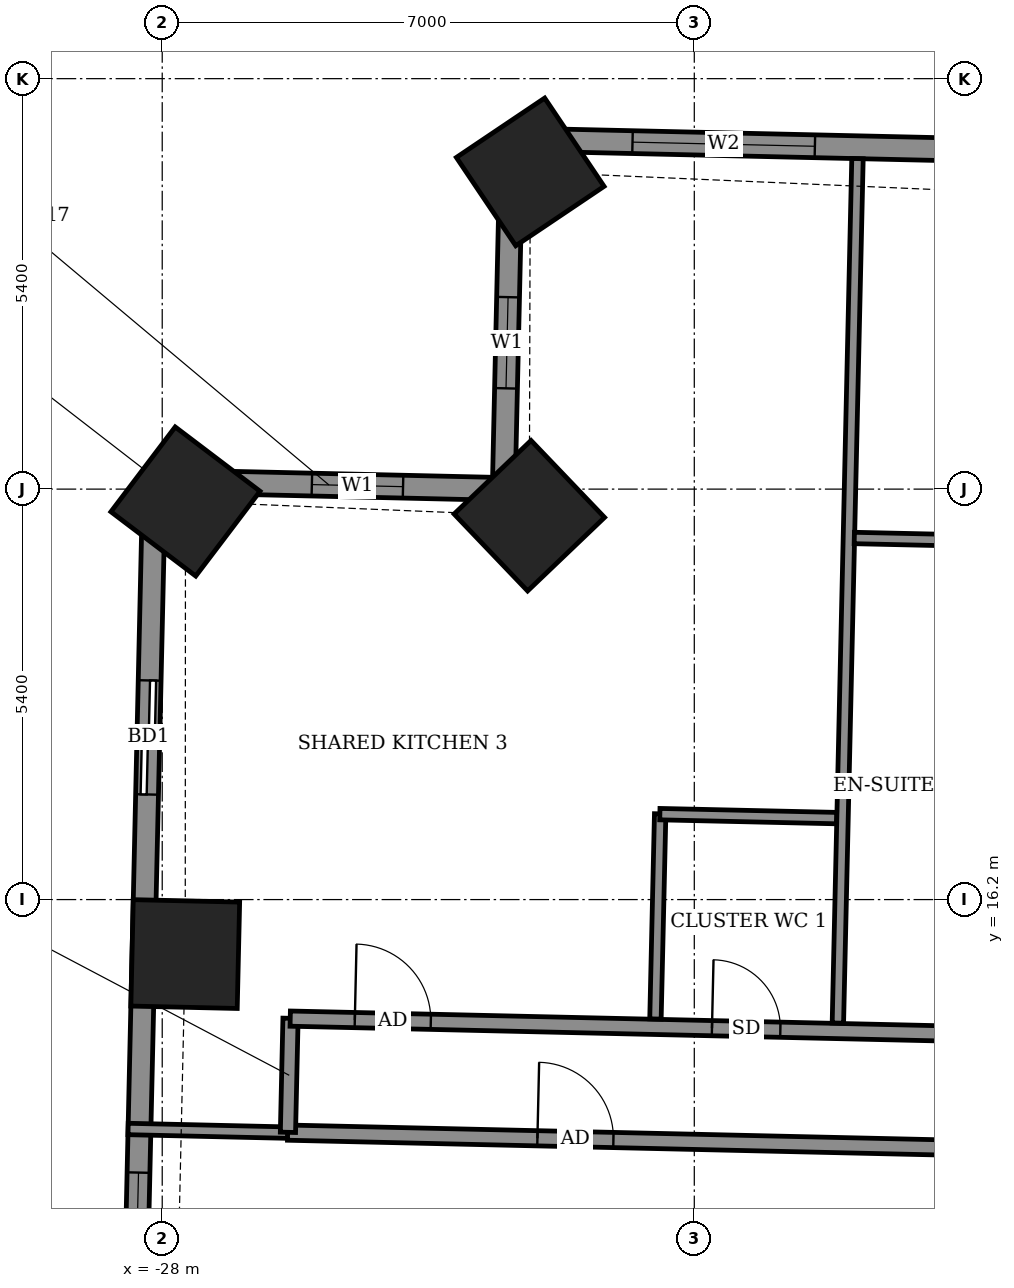
"""IFC4 building model, lengths in metres.
Left out: names, types, materials, properties, quantities, classifications, styles, units other than length and angle.
Written with IfcOpenShell. Run it as: python <this file> out.ifc"""

import sys

from ifc_helpers import new_model, si_unit, direction, frame, frame_2d, origin, origin_2d, place, context, subcontext, project, spatial, rectangle, extrude, element, fill, save


model = new_model("IFC4")
c1 = context("Model", 3, precision=1e-05, world=origin(), true_north=direction((0.0, 1.0)))
c2 = subcontext(c1, "Body", "Model", "MODEL_VIEW")
j1 = project(units=[si_unit("LENGTHUNIT", "METRE"), si_unit("PLANEANGLEUNIT", "RADIAN")], contexts=[c1])
p1 = place(None, origin())
s1 = spatial("IfcSite", under=j1, at=p1, CompositionType="ELEMENT")
p2 = place(p1, origin())
s2 = spatial("IfcBuilding", under=s1, at=p2, CompositionType="ELEMENT")
p3 = place(p2, frame((0.0, 0.0, 109.1)))
s3 = spatial("IfcBuildingStorey", under=s2, at=p3, CompositionType="ELEMENT", Elevation=109.1)
for number, where, z_axis, x_axis in (
    (1, (-23.158, 25.773, -0.55), (0.0, 0.0, 1.0), (-0.83, -0.558, 0.0)),
    (2, (-23.17, 21.25, -0.55), (0.0, 0.0, 1.0), (-0.723, -0.691, 0.0)),
    (3, (-27.694, 21.437, -0.55), (0.0, 0.0, 1.0), (-0.604, -0.797, 0.0)),
    (4, (-27.697, 15.483, -0.55), (0.0, 0.0, 1.0), (-0.023, -1.0, 0.0)),
):
    element("IfcColumn", number, at=place(p3, frame(where, z_axis=z_axis, x_axis=x_axis)), inside=s3, PredefinedType="COLUMN", context=c2, shape_type="SweptSolid", body=[
        extrude(rectangle(XDim=1.4, YDim=1.4, at=origin_2d()), origin(), (0.0, 0.0, 1.0), 3.6),
    ])
p4 = place(p3, frame((21.894, 25.173, 0.0), z_axis=(0.0, 0.0, 1.0), x_axis=(-0.999742661083, 0.022685052594, 0.0)))
e5 = element("IfcWall", 5, at=p4, inside=s3, PredefinedType="SOLIDWALL", context=c2, shape_type="SweptSolid", body=[
    extrude(rectangle(XDim=45.309, YDim=0.3, at=frame_2d((22.654, 0.0))), origin(), (0.0, 0.0, 1.0), 3.05),
])
p5 = place(p4, frame((2.319, 0.0, 0.0)))
e6 = element("IfcOpeningElement", 6, at=p5, cuts=e5, PredefinedType="OPENING", context=c2, shape_type="SweptSolid", body=[
    extrude(rectangle(XDim=1.5, YDim=2.4, at=frame_2d((0.75, 1.2))), frame((0.0, 0.16, 0.0), z_axis=(0.0, -1.0, 0.0), x_axis=(1.0, 0.0, 0.0)), (0.0, 0.0, 1.0), 0.32),
])
p6 = place(p4, frame((7.437, 0.0, 0.0)))
e7 = element("IfcOpeningElement", 7, at=p6, cuts=e5, PredefinedType="OPENING", context=c2, shape_type="SweptSolid", body=[
    extrude(rectangle(XDim=1.5, YDim=2.4, at=frame_2d((0.75, 1.2))), frame((0.0, 0.16, 0.0), z_axis=(0.0, -1.0, 0.0), x_axis=(1.0, 0.0, 0.0)), (0.0, 0.0, 1.0), 0.32),
])
p7 = place(p4, frame((10.244, 0.0, 0.0)))
e8 = element("IfcOpeningElement", 8, at=p7, cuts=e5, PredefinedType="OPENING", context=c2, shape_type="SweptSolid", body=[
    extrude(rectangle(XDim=1.5, YDim=2.4, at=frame_2d((0.75, 1.2))), frame((0.0, 0.16, 0.0), z_axis=(0.0, -1.0, 0.0), x_axis=(1.0, 0.0, 0.0)), (0.0, 0.0, 1.0), 0.32),
])
p8 = place(p4, frame((15.583, 0.0, 0.0)))
e9 = element("IfcOpeningElement", 9, at=p8, cuts=e5, PredefinedType="OPENING", context=c2, shape_type="SweptSolid", body=[
    extrude(rectangle(XDim=1.5, YDim=2.4, at=frame_2d((0.75, 1.2))), frame((0.0, 0.16, 0.0), z_axis=(0.0, -1.0, 0.0), x_axis=(1.0, 0.0, 0.0)), (0.0, 0.0, 1.0), 0.32),
])
p9 = place(p4, frame((20.677, 0.0, 0.0)))
e10 = element("IfcOpeningElement", 10, at=p9, cuts=e5, PredefinedType="OPENING", context=c2, shape_type="SweptSolid", body=[
    extrude(rectangle(XDim=1.5, YDim=2.4, at=frame_2d((0.75, 1.2))), frame((0.0, 0.16, 0.0), z_axis=(0.0, -1.0, 0.0), x_axis=(1.0, 0.0, 0.0)), (0.0, 0.0, 1.0), 0.32),
])
p10 = place(p4, frame((23.485, 0.0, 0.0)))
e11 = element("IfcOpeningElement", 11, at=p10, cuts=e5, PredefinedType="OPENING", context=c2, shape_type="SweptSolid", body=[
    extrude(rectangle(XDim=1.5, YDim=2.4, at=frame_2d((0.75, 1.2))), frame((0.0, 0.16, 0.0), z_axis=(0.0, -1.0, 0.0), x_axis=(1.0, 0.0, 0.0)), (0.0, 0.0, 1.0), 0.32),
])
p11 = place(p4, frame((28.708, 0.0, 0.0)))
e12 = element("IfcOpeningElement", 12, at=p11, cuts=e5, PredefinedType="OPENING", context=c2, shape_type="SweptSolid", body=[
    extrude(rectangle(XDim=1.5, YDim=2.4, at=frame_2d((0.75, 1.2))), frame((0.0, 0.16, 0.0), z_axis=(0.0, -1.0, 0.0), x_axis=(1.0, 0.0, 0.0)), (0.0, 0.0, 1.0), 0.32),
])
p12 = place(p4, frame((33.793, 0.0, 0.0)))
e13 = element("IfcOpeningElement", 13, at=p12, cuts=e5, PredefinedType="OPENING", context=c2, shape_type="SweptSolid", body=[
    extrude(rectangle(XDim=1.5, YDim=2.4, at=frame_2d((0.75, 1.2))), frame((0.0, 0.16, 0.0), z_axis=(0.0, -1.0, 0.0), x_axis=(1.0, 0.0, 0.0)), (0.0, 0.0, 1.0), 0.32),
])
p13 = place(p4, frame((36.6, 0.0, 0.0)))
e14 = element("IfcOpeningElement", 14, at=p13, cuts=e5, PredefinedType="OPENING", context=c2, shape_type="SweptSolid", body=[
    extrude(rectangle(XDim=1.5, YDim=2.4, at=frame_2d((0.75, 1.2))), frame((0.0, 0.16, 0.0), z_axis=(0.0, -1.0, 0.0), x_axis=(1.0, 0.0, 0.0)), (0.0, 0.0, 1.0), 0.32),
])
p14 = place(p4, frame((41.318, 0.0, 0.9)))
e15 = element("IfcOpeningElement", 15, at=p14, cuts=e5, PredefinedType="OPENING", context=c2, shape_type="SweptSolid", body=[
    extrude(rectangle(XDim=2.4, YDim=1.5, at=frame_2d((1.2, 0.75))), frame((0.0, 0.16, 0.0), z_axis=(0.0, -1.0, 0.0), x_axis=(1.0, 0.0, 0.0)), (0.0, 0.0, 1.0), 0.32),
])
p15 = place(p3, frame((-23.403, 26.201, 0.0), z_axis=(0.0, 0.0, 1.0), x_axis=(-0.022609285172, -0.999744377441, 0.0)))
e16 = element("IfcWall", 16, at=p15, inside=s3, PredefinedType="SOLIDWALL", context=c2, shape_type="SweptSolid", body=[
    extrude(rectangle(XDim=4.6, YDim=0.3, at=frame_2d((2.3, 0.0))), origin(), (0.0, 0.0, 1.0), 2.55),
])
p16 = place(p15, frame((2.076, 0.0, 0.9)))
e17 = element("IfcOpeningElement", 17, at=p16, cuts=e16, PredefinedType="OPENING", context=c2, shape_type="SweptSolid", body=[
    extrude(rectangle(XDim=1.2, YDim=1.5, at=frame_2d((0.6, 0.75))), frame((0.0, 0.16, 0.0), z_axis=(0.0, -1.0, 0.0), x_axis=(1.0, 0.0, 0.0)), (0.0, 0.0, 1.0), 0.32),
])
p17 = place(p3, frame((-23.507, 21.602, 0.0), z_axis=(0.0, 0.0, 1.0), x_axis=(-0.999739556364, 0.022821468877, 0.0)))
e18 = element("IfcWall", 18, at=p17, inside=s3, PredefinedType="SOLIDWALL", context=c2, shape_type="SweptSolid", body=[
    extrude(rectangle(XDim=4.6, YDim=0.3, at=frame_2d((2.3, 0.0))), origin(), (0.0, 0.0, 1.0), 2.55),
])
p18 = place(p17, frame((1.325, 0.0, 0.9)))
e19 = element("IfcOpeningElement", 19, at=p18, cuts=e18, PredefinedType="OPENING", context=c2, shape_type="SweptSolid", body=[
    extrude(rectangle(XDim=1.2, YDim=1.5, at=frame_2d((0.6, 0.75))), frame((0.0, 0.16, 0.0), z_axis=(0.0, -1.0, 0.0), x_axis=(1.0, 0.0, 0.0)), (0.0, 0.0, 1.0), 0.32),
])
p19 = place(p3, frame((-28.106, 21.707, 0.0), z_axis=(0.0, 0.0, 1.0), x_axis=(-0.022654663697, -0.999743350172, 0.0)))
e20 = element("IfcWall", 20, at=p19, inside=s3, PredefinedType="SOLIDWALL", context=c2, shape_type="SweptSolid", body=[
    extrude(rectangle(XDim=12.63, YDim=0.3, at=frame_2d((6.315, 0.0))), origin(), (0.0, 0.0, 1.0), 3.05),
])
p20 = place(p19, frame((2.625, 0.0, 0.0)))
e21 = element("IfcOpeningElement", 21, at=p20, cuts=e20, PredefinedType="OPENING", context=c2, shape_type="SweptSolid", body=[
    extrude(rectangle(XDim=1.5, YDim=2.4, at=frame_2d((0.75, 1.2))), frame((0.0, 0.16, 0.0), z_axis=(0.0, -1.0, 0.0), x_axis=(1.0, 0.0, 0.0)), (0.0, 0.0, 1.0), 0.32),
])
p21 = place(p19, frame((9.101, 0.0, 0.9)))
e22 = element("IfcOpeningElement", 22, at=p21, cuts=e20, PredefinedType="OPENING", context=c2, shape_type="SweptSolid", body=[
    extrude(rectangle(XDim=2.4, YDim=1.5, at=frame_2d((1.2, 0.75))), frame((0.0, 0.16, 0.0), z_axis=(0.0, -1.0, 0.0), x_axis=(1.0, 0.0, 0.0)), (0.0, 0.0, 1.0), 0.32),
])
p22 = place(p3, frame((-28.449, 13.182, 0.0), z_axis=(0.0, 0.0, 1.0), x_axis=(0.999741236023, -0.022747769011, 0.0)))
e23 = element("IfcWall", 23, at=p22, inside=s3, PredefinedType="PARTITIONING", context=c2, shape_type="SweptSolid", body=[
    extrude(rectangle(XDim=2.104, YDim=0.15, at=frame_2d((1.052, 0.0))), origin(), (0.0, 0.0, 1.0), 2.55),
])
p23 = place(p3, frame((-26.35, 13.134, 0.0), z_axis=(0.0, 0.0, 1.0), x_axis=(0.999743721339, -0.022638278294, 0.0)))
e24 = element("IfcWall", 24, at=p23, inside=s3, PredefinedType="PARTITIONING", context=c2, shape_type="SweptSolid", body=[
    extrude(rectangle(XDim=9.674, YDim=0.2, at=frame_2d((4.837, 0.0))), origin(), (0.0, 0.0, 1.0), 3.05),
])
p24 = place(p23, frame((3.287, 0.0, 0.0)))
e25 = element("IfcOpeningElement", 25, at=p24, cuts=e24, PredefinedType="OPENING", context=c2, shape_type="SweptSolid", body=[
    extrude(rectangle(XDim=1.0, YDim=2.1, at=frame_2d((0.5, 1.05))), frame((0.0, 0.11, 0.0), z_axis=(0.0, -1.0, 0.0), x_axis=(1.0, 0.0, 0.0)), (0.0, 0.0, 1.0), 0.22),
])
p25 = place(p3, frame((-26.346, 13.138, 0.0), z_axis=(0.0, 0.0, 1.0), x_axis=(0.022617910375, 0.999744182344, 0.0)))
e26 = element("IfcWall", 26, at=p25, inside=s3, PredefinedType="PARTITIONING", context=c2, shape_type="SweptSolid", body=[
    extrude(rectangle(XDim=1.5, YDim=0.2, at=frame_2d((0.75, 0.0))), origin(), (0.0, 0.0, 1.0), 3.05),
])
p26 = place(p3, frame((-26.316, 14.634, 0.0), z_axis=(0.0, 0.0, 1.0), x_axis=(0.999742734556, -0.02268181435, 0.0)))
e27 = element("IfcWall", 27, at=p26, inside=s3, PredefinedType="PARTITIONING", context=c2, shape_type="SweptSolid", body=[
    extrude(rectangle(XDim=50.708, YDim=0.2, at=frame_2d((25.354, 0.0))), origin(), (0.0, 0.0, 1.0), 3.05),
])
p27 = place(p26, frame((48.229, 0.0, 0.0)))
e28 = element("IfcOpeningElement", 28, at=p27, cuts=e27, PredefinedType="OPENING", context=c2, shape_type="SweptSolid", body=[
    extrude(rectangle(XDim=1.0, YDim=2.1, at=frame_2d((0.5, 1.05))), frame((0.0, 0.11, 0.0), z_axis=(0.0, -1.0, 0.0), x_axis=(1.0, 0.0, 0.0)), (0.0, 0.0, 1.0), 0.22),
])
p28 = place(p26, frame((43.6, 0.0, 0.0)))
e29 = element("IfcOpeningElement", 29, at=p28, cuts=e27, PredefinedType="OPENING", context=c2, shape_type="SweptSolid", body=[
    extrude(rectangle(XDim=0.9, YDim=2.1, at=frame_2d((0.45, 1.05))), frame((0.0, 0.11, 0.0), z_axis=(0.0, -1.0, 0.0), x_axis=(1.0, 0.0, 0.0)), (0.0, 0.0, 1.0), 0.22),
])
p29 = place(p26, frame((38.925, 0.0, 0.0)))
e30 = element("IfcOpeningElement", 30, at=p29, cuts=e27, PredefinedType="OPENING", context=c2, shape_type="SweptSolid", body=[
    extrude(rectangle(XDim=0.9, YDim=2.1, at=frame_2d((0.45, 1.05))), frame((0.0, 0.11, 0.0), z_axis=(0.0, -1.0, 0.0), x_axis=(1.0, 0.0, 0.0)), (0.0, 0.0, 1.0), 0.22),
])
p30 = place(p26, frame((36.9, 0.0, 0.0)))
e31 = element("IfcOpeningElement", 31, at=p30, cuts=e27, PredefinedType="OPENING", context=c2, shape_type="SweptSolid", body=[
    extrude(rectangle(XDim=0.9, YDim=2.1, at=frame_2d((0.45, 1.05))), frame((0.0, 0.11, 0.0), z_axis=(0.0, -1.0, 0.0), x_axis=(1.0, 0.0, 0.0)), (0.0, 0.0, 1.0), 0.22),
])
p31 = place(p26, frame((29.975, 0.0, 0.0)))
e32 = element("IfcOpeningElement", 32, at=p31, cuts=e27, PredefinedType="OPENING", context=c2, shape_type="SweptSolid", body=[
    extrude(rectangle(XDim=0.9, YDim=2.1, at=frame_2d((0.45, 1.05))), frame((0.0, 0.11, 0.0), z_axis=(0.0, -1.0, 0.0), x_axis=(1.0, 0.0, 0.0)), (0.0, 0.0, 1.0), 0.22),
])
p32 = place(p26, frame((27.9, 0.0, 0.0)))
e33 = element("IfcOpeningElement", 33, at=p32, cuts=e27, PredefinedType="OPENING", context=c2, shape_type="SweptSolid", body=[
    extrude(rectangle(XDim=0.9, YDim=2.1, at=frame_2d((0.45, 1.05))), frame((0.0, 0.11, 0.0), z_axis=(0.0, -1.0, 0.0), x_axis=(1.0, 0.0, 0.0)), (0.0, 0.0, 1.0), 0.22),
])
p33 = place(p26, frame((21.175, 0.0, 0.0)))
e34 = element("IfcOpeningElement", 34, at=p33, cuts=e27, PredefinedType="OPENING", context=c2, shape_type="SweptSolid", body=[
    extrude(rectangle(XDim=0.9, YDim=2.1, at=frame_2d((0.45, 1.05))), frame((0.0, 0.11, 0.0), z_axis=(0.0, -1.0, 0.0), x_axis=(1.0, 0.0, 0.0)), (0.0, 0.0, 1.0), 0.22),
])
p34 = place(p26, frame((19.25, 0.0, 0.0)))
e35 = element("IfcOpeningElement", 35, at=p34, cuts=e27, PredefinedType="OPENING", context=c2, shape_type="SweptSolid", body=[
    extrude(rectangle(XDim=0.9, YDim=2.1, at=frame_2d((0.45, 1.05))), frame((0.0, 0.11, 0.0), z_axis=(0.0, -1.0, 0.0), x_axis=(1.0, 0.0, 0.0)), (0.0, 0.0, 1.0), 0.22),
])
p35 = place(p26, frame((12.375, 0.0, 0.0)))
e36 = element("IfcOpeningElement", 36, at=p35, cuts=e27, PredefinedType="OPENING", context=c2, shape_type="SweptSolid", body=[
    extrude(rectangle(XDim=0.9, YDim=2.1, at=frame_2d((0.45, 1.05))), frame((0.0, 0.11, 0.0), z_axis=(0.0, -1.0, 0.0), x_axis=(1.0, 0.0, 0.0)), (0.0, 0.0, 1.0), 0.22),
])
p36 = place(p26, frame((10.225, 0.0, 0.0)))
e37 = element("IfcOpeningElement", 37, at=p36, cuts=e27, PredefinedType="OPENING", context=c2, shape_type="SweptSolid", body=[
    extrude(rectangle(XDim=0.9, YDim=2.1, at=frame_2d((0.45, 1.05))), frame((0.0, 0.11, 0.0), z_axis=(0.0, -1.0, 0.0), x_axis=(1.0, 0.0, 0.0)), (0.0, 0.0, 1.0), 0.22),
])
p37 = place(p26, frame((0.85, 0.0, 0.0)))
e38 = element("IfcOpeningElement", 38, at=p37, cuts=e27, PredefinedType="OPENING", context=c2, shape_type="SweptSolid", body=[
    extrude(rectangle(XDim=1.0, YDim=2.1, at=frame_2d((0.5, 1.05))), frame((0.0, 0.11, 0.0), z_axis=(0.0, -1.0, 0.0), x_axis=(1.0, 0.0, 0.0)), (0.0, 0.0, 1.0), 0.22),
])
p38 = place(p26, frame((5.55, 0.0, 0.0)))
e39 = element("IfcOpeningElement", 39, at=p38, cuts=e27, PredefinedType="OPENING", context=c2, shape_type="SweptSolid", body=[
    extrude(rectangle(XDim=0.9, YDim=2.1, at=frame_2d((0.45, 1.05))), frame((0.0, 0.11, 0.0), z_axis=(0.0, -1.0, 0.0), x_axis=(1.0, 0.0, 0.0)), (0.0, 0.0, 1.0), 0.22),
])
p39 = place(p3, frame((-21.511, 14.629, 0.0), z_axis=(0.0, 0.0, 1.0), x_axis=(0.022969966847, 0.999736155505, 0.0)))
e40 = element("IfcWall", 40, at=p39, inside=s3, PredefinedType="PARTITIONING", context=c2, shape_type="SweptSolid", body=[
    extrude(rectangle(XDim=2.7, YDim=0.15, at=frame_2d((1.35, 0.0))), origin(), (0.0, 0.0, 1.0), 3.05),
])
p40 = place(p3, frame((-19.111, 14.575, 0.0), z_axis=(0.0, 0.0, 1.0), x_axis=(0.022684355347, 0.999742676904, 0.0)))
e41 = element("IfcWall", 41, at=p40, inside=s3, PredefinedType="PARTITIONING", context=c2, shape_type="SweptSolid", body=[
    extrude(rectangle(XDim=11.376, YDim=0.15, at=frame_2d((5.688, 0.0))), origin(), (0.0, 0.0, 1.0), 2.55),
])
for number, where, z_axis, x_axis in (
    (42, (-21.453, 17.324, 0.0), (0.0, 0.0, 1.0), (1.0, -0.022, 0.0)),
    (43, (-18.895, 20.957, 0.0), (0.0, 0.0, 1.0), (1.0, -0.022, 0.0)),
):
    element("IfcWall", number, at=place(p3, frame(where, z_axis=z_axis, x_axis=x_axis)), inside=s3, PredefinedType="PARTITIONING", context=c2, shape_type="SweptSolid", body=[
        extrude(rectangle(XDim=2.324, YDim=0.15, at=frame_2d((1.162, 0.0))), origin(), (0.0, 0.0, 1.0), 3.05),
    ])
p41 = place(p14, origin())
e44 = element("IfcWindow", 44, at=p41, inside=s3, PartitioningType="DOUBLE_PANEL_VERTICAL", PredefinedType="WINDOW", context=c2, shape_type="SweptSolid", body=[
    extrude(rectangle(XDim=2.4, YDim=1.5, at=frame_2d((1.2, 0.75))), frame((0.0, 0.03, 0.0), z_axis=(0.0, -1.0, 0.0), x_axis=(1.0, 0.0, 0.0)), (0.0, 0.0, 1.0), 0.06),
])
fill(e15, e44)
p42 = place(p16, origin())
e45 = element("IfcWindow", 45, at=p42, inside=s3, PartitioningType="SINGLE_PANEL", PredefinedType="WINDOW", context=c2, shape_type="SweptSolid", body=[
    extrude(rectangle(XDim=1.2, YDim=1.5, at=frame_2d((0.6, 0.75))), frame((0.0, 0.03, 0.0), z_axis=(0.0, -1.0, 0.0), x_axis=(1.0, 0.0, 0.0)), (0.0, 0.0, 1.0), 0.06),
])
fill(e17, e45)
p43 = place(p18, origin())
e46 = element("IfcWindow", 46, at=p43, inside=s3, PartitioningType="SINGLE_PANEL", PredefinedType="WINDOW", context=c2, shape_type="SweptSolid", body=[
    extrude(rectangle(XDim=1.2, YDim=1.5, at=frame_2d((0.6, 0.75))), frame((0.0, 0.03, 0.0), z_axis=(0.0, -1.0, 0.0), x_axis=(1.0, 0.0, 0.0)), (0.0, 0.0, 1.0), 0.06),
])
fill(e19, e46)
p44 = place(p20, origin())
e47 = element("IfcDoor", 47, at=p44, inside=s3, OperationType="SLIDING_TO_LEFT", PredefinedType="DOOR", context=c2, shape_type="SweptSolid", body=[
    extrude(rectangle(XDim=1.5, YDim=2.4, at=frame_2d((0.75, 1.2))), frame((0.0, 0.025, 0.0), z_axis=(0.0, -1.0, 0.0), x_axis=(1.0, 0.0, 0.0)), (0.0, 0.0, 1.0), 0.05),
])
fill(e21, e47)
p45 = place(p21, origin())
e48 = element("IfcWindow", 48, at=p45, inside=s3, PartitioningType="DOUBLE_PANEL_VERTICAL", PredefinedType="WINDOW", context=c2, shape_type="SweptSolid", body=[
    extrude(rectangle(XDim=2.4, YDim=1.5, at=frame_2d((1.2, 0.75))), frame((0.0, 0.03, 0.0), z_axis=(0.0, -1.0, 0.0), x_axis=(1.0, 0.0, 0.0)), (0.0, 0.0, 1.0), 0.06),
])
fill(e22, e48)
p46 = place(p37, origin())
e49 = element("IfcDoor", 49, at=p46, inside=s3, OperationType="SINGLE_SWING_RIGHT", PredefinedType="DOOR", context=c2, shape_type="SweptSolid", body=[
    extrude(rectangle(XDim=1.0, YDim=2.1, at=frame_2d((0.5, 1.05))), frame((0.0, 0.025, 0.0), z_axis=(0.0, -1.0, 0.0), x_axis=(1.0, 0.0, 0.0)), (0.0, 0.0, 1.0), 0.05),
])
fill(e38, e49)
p47 = place(p38, origin())
e50 = element("IfcDoor", 50, at=p47, inside=s3, OperationType="SINGLE_SWING_LEFT", PredefinedType="DOOR", context=c2, shape_type="SweptSolid", body=[
    extrude(rectangle(XDim=0.9, YDim=2.1, at=frame_2d((0.45, 1.05))), frame((0.0, 0.025, 0.0), z_axis=(0.0, -1.0, 0.0), x_axis=(1.0, 0.0, 0.0)), (0.0, 0.0, 1.0), 0.05),
])
fill(e39, e50)
p48 = place(p24, origin())
e51 = element("IfcDoor", 51, at=p48, inside=s3, OperationType="SINGLE_SWING_LEFT", PredefinedType="DOOR", context=c2, shape_type="SweptSolid", body=[
    extrude(rectangle(XDim=1.0, YDim=2.1, at=frame_2d((0.5, 1.05))), frame((0.0, 0.025, 0.0), z_axis=(0.0, -1.0, 0.0), x_axis=(1.0, 0.0, 0.0)), (0.0, 0.0, 1.0), 0.05),
])
fill(e25, e51)
save(model, sys.argv[1])
